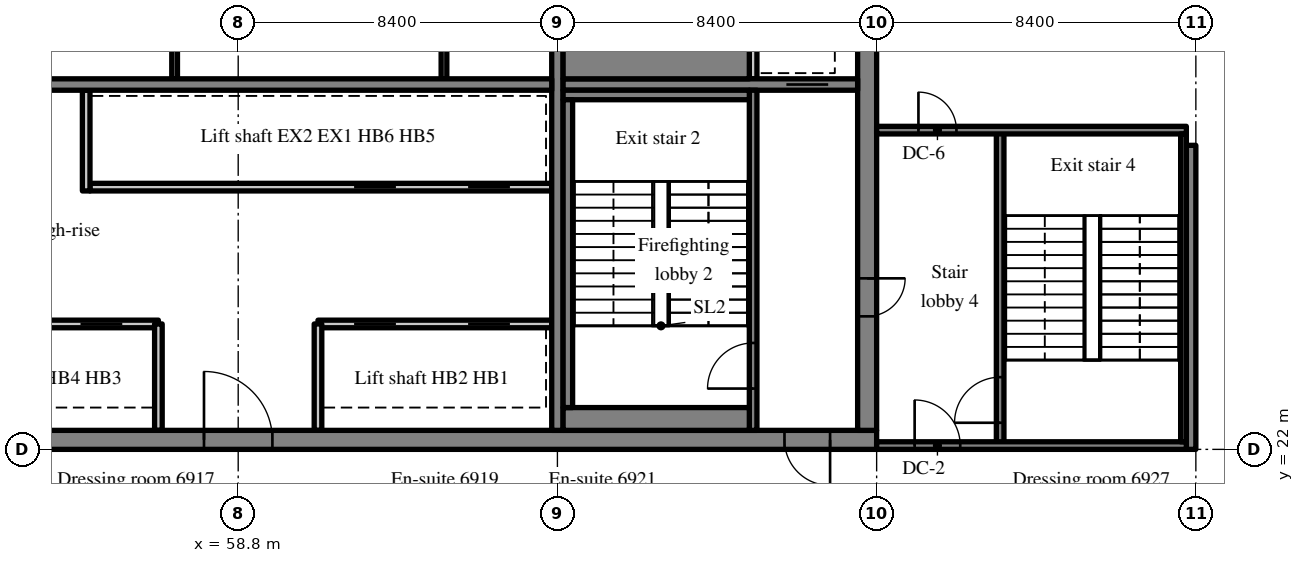
"""IFC4 building model, lengths in metres.
Left out: names, types, materials, properties, quantities, classifications, styles, units other than length and angle.
Written with IfcOpenShell. Run it as: python <this file> out.ifc"""

import sys

from ifc_helpers import new_model, si_unit, direction, frame, frame_2d, origin, place, context, subcontext, project, spatial, rectangle, extrude, source, transform, mapped, element, fill, save


model = new_model("IFC4")
c1 = context("Model", 3, precision=1e-05, world=origin(), true_north=direction((0.0, 1.0)))
c2 = subcontext(c1, "Body", "Model", "MODEL_VIEW")
j1 = project(units=[si_unit("LENGTHUNIT", "METRE"), si_unit("PLANEANGLEUNIT", "RADIAN")], contexts=[c1])
p1 = place(None, origin())
s1 = spatial("IfcSite", under=j1, at=p1, CompositionType="ELEMENT")
p2 = place(p1, origin())
s2 = spatial("IfcBuilding", under=s1, at=p2, CompositionType="ELEMENT")
p3 = place(p2, frame((0.0, 0.0, 289.7)))
s3 = spatial("IfcBuildingStorey", under=s2, at=p3, CompositionType="ELEMENT", Elevation=289.7)
m1 = source(origin(), c2, "Body", "SweptSolid", [
    extrude(rectangle(XDim=50.4, YDim=0.5, at=frame_2d((25.2, 0.0))), origin(), (0.0, 0.0, 1.0), 3.72),
])
p4 = place(p3, frame((25.2, 22.25, 0.0), z_axis=(0.0, 0.0, 1.0), x_axis=(1.0, 0.0, 0.0)))
e1 = element("IfcWall", 1, at=p4, inside=s3, PredefinedType="SHEAR", context=c2, shape_type="MappedRepresentation", body=[
    mapped(m1, transform((0.0, 0.0, 0.0), scale=1.0)),
])
m2 = source(origin(), c2, "Body", "SweptSolid", [
    extrude(rectangle(XDim=1.8, YDim=2.1, at=frame_2d((0.9, 1.05))), frame((0.0, 0.26, 0.0), z_axis=(0.0, -1.0, 0.0), x_axis=(1.0, 0.0, 0.0)), (0.0, 0.0, 1.0), 0.52),
])
p5 = place(p4, frame((15.9, 0.0, 0.0)))
e2 = element("IfcOpeningElement", 2, at=p5, cuts=e1, PredefinedType="OPENING", context=c2, shape_type="MappedRepresentation", body=[
    mapped(m2, transform((0.0, 0.0, 0.0), scale=1.0)),
])
m3 = source(origin(), c2, "Body", "SweptSolid", [
    extrude(rectangle(XDim=0.9, YDim=2.1, at=frame_2d((0.45, 1.05))), frame((0.0, 0.26, 0.0), z_axis=(0.0, -1.0, 0.0), x_axis=(1.0, 0.0, 0.0)), (0.0, 0.0, 1.0), 0.52),
])
p6 = place(p4, frame((9.675, 0.0, 0.0)))
e3 = element("IfcOpeningElement", 3, at=p6, cuts=e1, PredefinedType="OPENING", context=c2, shape_type="MappedRepresentation", body=[
    mapped(m3, transform((0.0, 0.0, 0.0), scale=1.0)),
])
p7 = place(p4, frame((21.525, 0.0, 0.0)))
e4 = element("IfcOpeningElement", 4, at=p7, cuts=e1, PredefinedType="OPENING", context=c2, shape_type="MappedRepresentation", body=[
    mapped(m3, transform((0.0, 0.0, 0.0), scale=1.0)),
])
p8 = place(p4, frame((32.7, 0.0, 0.0)))
e5 = element("IfcOpeningElement", 5, at=p8, cuts=e1, PredefinedType="OPENING", context=c2, shape_type="MappedRepresentation", body=[
    mapped(m2, transform((0.0, 0.0, 0.0), scale=1.0)),
])
m4 = source(origin(), c2, "Body", "SweptSolid", [
    extrude(rectangle(XDim=1.2, YDim=2.1, at=frame_2d((0.6, 1.05))), frame((0.0, 0.26, 0.0), z_axis=(0.0, -1.0, 0.0), x_axis=(1.0, 0.0, 0.0)), (0.0, 0.0, 1.0), 0.52),
])
p9 = place(p4, frame((6.5, 0.0, 0.0)))
e6 = element("IfcOpeningElement", 6, at=p9, cuts=e1, PredefinedType="OPENING", context=c2, shape_type="MappedRepresentation", body=[
    mapped(m4, transform((0.0, 0.0, 0.0), scale=1.0)),
])
p10 = place(p4, frame((47.975, 0.0, 0.0)))
e7 = element("IfcOpeningElement", 7, at=p10, cuts=e1, PredefinedType="OPENING", context=c2, shape_type="MappedRepresentation", body=[
    mapped(m4, transform((0.0, 0.0, 0.0), scale=1.0)),
])
m5 = source(origin(), c2, "Body", "SweptSolid", [
    extrude(rectangle(XDim=19.0, YDim=0.5, at=frame_2d((9.5, 0.0))), origin(), (0.0, 0.0, 1.0), 3.72),
])
p11 = place(p3, frame((75.35, 22.5, 0.0), z_axis=(0.0, 0.0, 1.0), x_axis=(0.0, 1.0, 0.0)))
e8 = element("IfcWall", 8, at=p11, inside=s3, PredefinedType="SHEAR", context=c2, shape_type="MappedRepresentation", body=[
    mapped(m5, transform((0.0, 0.0, 0.0), scale=1.0)),
])
m6 = source(origin(), c2, "Body", "SweptSolid", [
    extrude(rectangle(XDim=1.0, YDim=2.1, at=frame_2d((0.5, 1.05))), frame((0.0, 0.26, 0.0), z_axis=(0.0, -1.0, 0.0), x_axis=(1.0, 0.0, 0.0)), (0.0, 0.0, 1.0), 0.52),
])
p12 = place(p11, frame((3.0, 0.0, 0.0)))
e9 = element("IfcOpeningElement", 9, at=p12, cuts=e8, PredefinedType="OPENING", context=c2, shape_type="MappedRepresentation", body=[
    mapped(m6, transform((0.0, 0.0, 0.0), scale=1.0)),
])
p13 = place(p11, frame((12.9, 0.0, 0.0)))
e10 = element("IfcOpeningElement", 10, at=p13, cuts=e8, PredefinedType="OPENING", context=c2, shape_type="MappedRepresentation", body=[
    mapped(m4, transform((0.0, 0.0, 0.0), scale=1.0)),
])
m7 = source(origin(), c2, "Body", "SweptSolid", [
    extrude(rectangle(XDim=19.0, YDim=0.3, at=frame_2d((9.5, 0.0))), origin(), (0.0, 0.0, 1.0), 3.72),
])
p14 = place(p3, frame((67.2, 22.5, 0.0), z_axis=(0.0, 0.0, 1.0), x_axis=(0.0, 1.0, 0.0)))
e11 = element("IfcWall", 11, at=p14, inside=s3, PredefinedType="SHEAR", context=c2, shape_type="MappedRepresentation", body=[
    mapped(m7, transform((0.0, 0.0, 0.0), scale=1.0)),
])
m8 = source(origin(), c2, "Body", "SweptSolid", [
    extrude(rectangle(XDim=16.5, YDim=0.3, at=frame_2d((8.25, 0.0))), origin(), (0.0, 0.0, 1.0), 3.72),
])
p15 = place(p3, frame((50.55, 31.6, 0.0), z_axis=(0.0, 0.0, 1.0), x_axis=(1.0, 0.0, 0.0)))
e12 = element("IfcWall", 12, at=p15, inside=s3, PredefinedType="SHEAR", context=c2, shape_type="MappedRepresentation", body=[
    mapped(m8, transform((0.0, 0.0, 0.0), scale=1.0)),
])
m9 = source(origin(), c2, "Body", "SweptSolid", [
    extrude(rectangle(XDim=1.0, YDim=2.1, at=frame_2d((0.5, 1.05))), frame((0.0, 0.16, 0.0), z_axis=(0.0, -1.0, 0.0), x_axis=(1.0, 0.0, 0.0)), (0.0, 0.0, 1.0), 0.32),
])
p16 = place(p15, frame((0.625, 0.0, 0.0)))
e13 = element("IfcOpeningElement", 13, at=p16, cuts=e12, PredefinedType="OPENING", context=c2, shape_type="MappedRepresentation", body=[
    mapped(m9, transform((0.0, 0.0, 0.0), scale=1.0)),
])
m10 = source(origin(), c2, "Body", "SweptSolid", [
    extrude(rectangle(XDim=7.75, YDim=0.3, at=frame_2d((3.875, 0.0))), origin(), (0.0, 0.0, 1.0), 3.72),
])
p17 = place(p3, frame((67.35, 31.6, 0.0), z_axis=(0.0, 0.0, 1.0), x_axis=(1.0, 0.0, 0.0)))
e14 = element("IfcWall", 14, at=p17, inside=s3, PredefinedType="SHEAR", context=c2, shape_type="MappedRepresentation", body=[
    mapped(m10, transform((0.0, 0.0, 0.0), scale=1.0)),
])
m11 = source(origin(), c2, "Body", "SweptSolid", [
    extrude(rectangle(XDim=1.1, YDim=2.1, at=frame_2d((0.55, 1.05))), frame((0.0, 0.16, 0.0), z_axis=(0.0, -1.0, 0.0), x_axis=(1.0, 0.0, 0.0)), (0.0, 0.0, 1.0), 0.32),
])
p18 = place(p17, frame((5.875, 0.0, 0.0)))
e15 = element("IfcOpeningElement", 15, at=p18, cuts=e14, PredefinedType="OPENING", context=c2, shape_type="MappedRepresentation", body=[
    mapped(m11, transform((0.0, 0.0, 0.0), scale=1.0)),
])
m12 = source(origin(), c2, "Body", "SweptSolid", [
    extrude(rectangle(XDim=8.0, YDim=0.25, at=frame_2d((4.0, 0.0))), origin(), (0.0, 0.0, 1.0), 3.72),
])
p19 = place(p3, frame((83.875, 22.0, 0.0), z_axis=(0.0, 0.0, 1.0), x_axis=(0.0, 1.0, 0.0)))
e16 = element("IfcWall", 16, at=p19, inside=s3, PredefinedType="SHEAR", context=c2, shape_type="MappedRepresentation", body=[
    mapped(m12, transform((0.0, 0.0, 0.0), scale=1.0)),
])
m13 = source(origin(), c2, "Body", "SweptSolid", [
    extrude(rectangle(XDim=6.15, YDim=0.2, at=frame_2d((3.075, 0.0))), origin(), (0.0, 0.0, 1.0), 3.72),
])
p20 = place(p3, frame((67.05, 25.3, 0.0), z_axis=(0.0, 0.0, 1.0), x_axis=(-1.0, 0.0, 0.0)))
e17 = element("IfcWall", 17, at=p20, inside=s3, PredefinedType="SOLIDWALL", context=c2, shape_type="MappedRepresentation", body=[
    mapped(m13, transform((0.0, 0.0, 0.0), scale=1.0)),
])
m14 = source(origin(), c2, "Body", "SweptSolid", [
    extrude(rectangle(XDim=1.1, YDim=2.1, at=frame_2d((0.55, 1.05))), frame((0.0, 0.11, 0.0), z_axis=(0.0, -1.0, 0.0), x_axis=(1.0, 0.0, 0.0)), (0.0, 0.0, 1.0), 0.22),
])
p21 = place(p20, frame((1.1, 0.0, 0.0)))
e18 = element("IfcOpeningElement", 18, at=p21, cuts=e17, PredefinedType="OPENING", context=c2, shape_type="MappedRepresentation", body=[
    mapped(m14, transform((0.0, 0.0, 0.0), scale=1.0)),
])
p22 = place(p20, frame((4.1, 0.0, 0.0)))
e19 = element("IfcOpeningElement", 19, at=p22, cuts=e17, PredefinedType="OPENING", context=c2, shape_type="MappedRepresentation", body=[
    mapped(m14, transform((0.0, 0.0, 0.0), scale=1.0)),
])
m15 = source(origin(), c2, "Body", "SweptSolid", [
    extrude(rectangle(XDim=6.0, YDim=0.2, at=frame_2d((3.0, 0.0))), origin(), (0.0, 0.0, 1.0), 3.72),
])
p23 = place(p3, frame((56.7, 25.3, 0.0), z_axis=(0.0, 0.0, 1.0), x_axis=(-1.0, 0.0, 0.0)))
e20 = element("IfcWall", 20, at=p23, inside=s3, PredefinedType="SOLIDWALL", context=c2, shape_type="MappedRepresentation", body=[
    mapped(m15, transform((0.0, 0.0, 0.0), scale=1.0)),
])
p24 = place(p23, frame((0.95, 0.0, 0.0)))
e21 = element("IfcOpeningElement", 21, at=p24, cuts=e20, PredefinedType="OPENING", context=c2, shape_type="MappedRepresentation", body=[
    mapped(m14, transform((0.0, 0.0, 0.0), scale=1.0)),
])
p25 = place(p23, frame((3.95, 0.0, 0.0)))
e22 = element("IfcOpeningElement", 22, at=p25, cuts=e20, PredefinedType="OPENING", context=c2, shape_type="MappedRepresentation", body=[
    mapped(m14, transform((0.0, 0.0, 0.0), scale=1.0)),
])
m16 = source(origin(), c2, "Body", "SweptSolid", [
    extrude(rectangle(XDim=12.15, YDim=0.2, at=frame_2d((6.075, 0.0))), origin(), (0.0, 0.0, 1.0), 3.72),
])
p26 = place(p3, frame((67.05, 28.9, 0.0), z_axis=(0.0, 0.0, 1.0), x_axis=(-1.0, 0.0, 0.0)))
e23 = element("IfcWall", 23, at=p26, inside=s3, PredefinedType="SOLIDWALL", context=c2, shape_type="MappedRepresentation", body=[
    mapped(m16, transform((0.0, 0.0, 0.0), scale=1.0)),
])
p27 = place(p26, frame((1.1, 0.0, 0.0)))
e24 = element("IfcOpeningElement", 24, at=p27, cuts=e23, PredefinedType="OPENING", context=c2, shape_type="MappedRepresentation", body=[
    mapped(m14, transform((0.0, 0.0, 0.0), scale=1.0)),
])
p28 = place(p26, frame((4.1, 0.0, 0.0)))
e25 = element("IfcOpeningElement", 25, at=p28, cuts=e23, PredefinedType="OPENING", context=c2, shape_type="MappedRepresentation", body=[
    mapped(m14, transform((0.0, 0.0, 0.0), scale=1.0)),
])
m17 = source(origin(), c2, "Body", "SweptSolid", [
    extrude(rectangle(XDim=2.8, YDim=0.2, at=frame_2d((1.4, 0.0))), origin(), (0.0, 0.0, 1.0), 3.72),
])
for number, where, z_axis, x_axis in (
    (26, (60.9, 22.5, 0.0), (0.0, 0.0, 1.0), (0.0, 1.0, 0.0)),
    (27, (56.7, 22.5, 0.0), (0.0, 0.0, 1.0), (0.0, 1.0, 0.0)),
):
    element("IfcWall", number, at=place(p3, frame(where, z_axis=z_axis, x_axis=x_axis)), inside=s3, PredefinedType="SOLIDWALL", context=c2, shape_type="MappedRepresentation", body=[
        mapped(m17, transform((0.0, 0.0, 0.0), scale=1.0)),
    ])
m18 = source(origin(), c2, "Body", "SweptSolid", [
    extrude(rectangle(XDim=2.65, YDim=0.2, at=frame_2d((1.325, 0.0))), origin(), (0.0, 0.0, 1.0), 3.72),
])
p29 = place(p3, frame((54.8, 28.8, 0.0), z_axis=(0.0, 0.0, 1.0), x_axis=(0.0, 1.0, 0.0)))
e28 = element("IfcWall", 28, at=p29, inside=s3, PredefinedType="SOLIDWALL", context=c2, shape_type="MappedRepresentation", body=[
    mapped(m18, transform((0.0, 0.0, 0.0), scale=1.0)),
])
m19 = source(origin(), c2, "Body", "SweptSolid", [
    extrude(rectangle(XDim=3.25, YDim=0.15, at=frame_2d((1.625, 0.0))), origin(), (0.0, 0.0, 1.0), 3.72),
])
for number, where, z_axis, x_axis in (
    (29, (64.215, 31.75, 0.0), (0.0, 0.0, 1.0), (0.0, 1.0, 0.0)),
    (30, (57.127, 31.75, 0.0), (0.0, 0.0, 1.0), (0.0, 1.0, 0.0)),
):
    element("IfcWall", number, at=place(p3, frame(where, z_axis=z_axis, x_axis=x_axis)), inside=s3, PredefinedType="PARTITIONING", context=c2, shape_type="MappedRepresentation", body=[
        mapped(m19, transform((0.0, 0.0, 0.0), scale=1.0)),
    ])
m20 = source(origin(), c2, "Body", "SweptSolid", [
    extrude(rectangle(XDim=8.95, YDim=0.2, at=frame_2d((4.475, 0.0))), origin(), (0.0, 0.0, 1.0), 3.72),
])
p30 = place(p3, frame((72.35, 22.5, 0.0), z_axis=(0.0, 0.0, 1.0), x_axis=(0.0, 1.0, 0.0)))
e31 = element("IfcWall", 31, at=p30, inside=s3, PredefinedType="SOLIDWALL", context=c2, shape_type="MappedRepresentation", body=[
    mapped(m20, transform((0.0, 0.0, 0.0), scale=1.0)),
])
m21 = source(origin(), c2, "Body", "SweptSolid", [
    extrude(rectangle(XDim=1.2, YDim=2.1, at=frame_2d((0.6, 1.05))), frame((0.0, 0.11, 0.0), z_axis=(0.0, -1.0, 0.0), x_axis=(1.0, 0.0, 0.0)), (0.0, 0.0, 1.0), 0.22),
])
p31 = place(p30, frame((1.1, 0.0, 0.0)))
e32 = element("IfcOpeningElement", 32, at=p31, cuts=e31, PredefinedType="OPENING", context=c2, shape_type="MappedRepresentation", body=[
    mapped(m21, transform((0.0, 0.0, 0.0), scale=1.0)),
])
m22 = source(origin(), c2, "Body", "SweptSolid", [
    extrude(rectangle(XDim=1.85, YDim=0.2, at=frame_2d((0.925, 0.0))), origin(), (0.0, 0.0, 1.0), 3.72),
])
p32 = place(p3, frame((72.35, 31.75, 0.0), z_axis=(0.0, 0.0, 1.0), x_axis=(0.0, 1.0, 0.0)))
e33 = element("IfcWall", 33, at=p32, inside=s3, PredefinedType="SOLIDWALL", context=c2, shape_type="MappedRepresentation", body=[
    mapped(m22, transform((0.0, 0.0, 0.0), scale=1.0)),
])
m23 = source(origin(), c2, "Body", "SweptSolid", [
    extrude(rectangle(XDim=8.3, YDim=0.2, at=frame_2d((4.15, 0.0))), origin(), (0.0, 0.0, 1.0), 3.72),
])
p33 = place(p3, frame((78.85, 22.1, 0.0), z_axis=(0.0, 0.0, 1.0), x_axis=(0.0, 1.0, 0.0)))
e34 = element("IfcWall", 34, at=p33, inside=s3, PredefinedType="SOLIDWALL", context=c2, shape_type="MappedRepresentation", body=[
    mapped(m23, transform((0.0, 0.0, 0.0), scale=1.0)),
])
p34 = place(p33, frame((0.6, 0.0, 0.0)))
e35 = element("IfcOpeningElement", 35, at=p34, cuts=e34, PredefinedType="OPENING", context=c2, shape_type="MappedRepresentation", body=[
    mapped(m21, transform((0.0, 0.0, 0.0), scale=1.0)),
])
m24 = source(origin(), c2, "Body", "SweptSolid", [
    extrude(rectangle(XDim=8.15, YDim=0.2, at=frame_2d((4.075, 0.0))), origin(), (0.0, 0.0, 1.0), 3.72),
])
p35 = place(p3, frame((83.75, 22.1, 0.0), z_axis=(0.0, 0.0, 1.0), x_axis=(-1.0, 0.0, 0.0)))
e36 = element("IfcWall", 36, at=p35, inside=s3, PredefinedType="SOLIDWALL", context=c2, shape_type="MappedRepresentation", body=[
    mapped(m24, transform((0.0, 0.0, 0.0), scale=1.0)),
])
p36 = place(p35, frame((5.95, 0.0, 0.0)))
e37 = element("IfcOpeningElement", 37, at=p36, cuts=e36, PredefinedType="OPENING", context=c2, shape_type="MappedRepresentation", body=[
    mapped(m21, transform((0.0, 0.0, 0.0), scale=1.0)),
])
p37 = place(p3, frame((83.75, 30.4, 0.0), z_axis=(0.0, 0.0, 1.0), x_axis=(-1.0, 0.0, 0.0)))
e38 = element("IfcWall", 38, at=p37, inside=s3, PredefinedType="SOLIDWALL", context=c2, shape_type="MappedRepresentation", body=[
    mapped(m24, transform((0.0, 0.0, 0.0), scale=1.0)),
])
m25 = source(origin(), c2, "Body", "SweptSolid", [
    extrude(rectangle(XDim=1.0, YDim=2.1, at=frame_2d((0.5, 1.05))), frame((0.0, 0.11, 0.0), z_axis=(0.0, -1.0, 0.0), x_axis=(1.0, 0.0, 0.0)), (0.0, 0.0, 1.0), 0.22),
])
p38 = place(p37, frame((6.05, 0.0, 0.0)))
e39 = element("IfcOpeningElement", 39, at=p38, cuts=e38, PredefinedType="OPENING", context=c2, shape_type="MappedRepresentation", body=[
    mapped(m25, transform((0.0, 0.0, 0.0), scale=1.0)),
])
m26 = source(origin(), c2, "Body", "SweptSolid", [
    extrude(rectangle(XDim=4.9, YDim=0.6, at=frame_2d((2.45, 0.0))), origin(), (0.0, 0.0, 1.0), 3.72),
])
p39 = place(p3, frame((67.35, 22.8, 0.0), z_axis=(0.0, 0.0, 1.0), x_axis=(1.0, 0.0, 0.0)))
e40 = element("IfcWall", 40, at=p39, inside=s3, PredefinedType="SOLIDWALL", context=c2, shape_type="MappedRepresentation", body=[
    mapped(m26, transform((0.0, 0.0, 0.0), scale=1.0)),
])
m27 = source(origin(), c2, "Body", "SweptSolid", [
    extrude(rectangle(XDim=4.9, YDim=0.25, at=frame_2d((2.45, 0.0))), origin(), (0.0, 0.0, 1.0), 3.72),
])
p40 = place(p3, frame((67.35, 31.325, 0.0), z_axis=(0.0, 0.0, 1.0), x_axis=(1.0, 0.0, 0.0)))
e41 = element("IfcWall", 41, at=p40, inside=s3, PredefinedType="SOLIDWALL", context=c2, shape_type="MappedRepresentation", body=[
    mapped(m27, transform((0.0, 0.0, 0.0), scale=1.0)),
])
m28 = source(origin(), c2, "Body", "SweptSolid", [
    extrude(rectangle(XDim=8.1, YDim=0.25, at=frame_2d((4.05, 0.0))), origin(), (0.0, 0.0, 1.0), 3.72),
])
p41 = place(p3, frame((67.475, 23.1, 0.0), z_axis=(0.0, 0.0, 1.0), x_axis=(0.0, 1.0, 0.0)))
e42 = element("IfcWall", 42, at=p41, inside=s3, PredefinedType="SOLIDWALL", context=c2, shape_type="MappedRepresentation", body=[
    mapped(m28, transform((0.0, 0.0, 0.0), scale=1.0)),
])
m29 = source(origin(), c2, "Body", "SweptSolid", [
    extrude(rectangle(XDim=4.9, YDim=1.05, at=frame_2d((2.45, 0.0))), origin(), (0.0, 0.0, 1.0), 3.72),
])
p42 = place(p3, frame((67.35, 32.275, 0.0), z_axis=(0.0, 0.0, 1.0), x_axis=(1.0, 0.0, 0.0)))
e43 = element("IfcWall", 43, at=p42, inside=s3, PredefinedType="SOLIDWALL", context=c2, shape_type="MappedRepresentation", body=[
    mapped(m29, transform((0.0, 0.0, 0.0), scale=1.0)),
])
m30 = source(origin(), c2, "Body", "SweptSolid", [
    extrude(rectangle(XDim=8.1, YDim=0.15, at=frame_2d((4.05, 0.0))), origin(), (0.0, 0.0, 1.0), 3.72),
])
p43 = place(p3, frame((83.675, 22.2, 0.0), z_axis=(0.0, 0.0, 1.0), x_axis=(0.0, 1.0, 0.0)))
e44 = element("IfcWall", 44, at=p43, inside=s3, PredefinedType="SOLIDWALL", context=c2, shape_type="MappedRepresentation", body=[
    mapped(m30, transform((0.0, 0.0, 0.0), scale=1.0)),
])
m31 = source(origin(), c2, "Body", "SweptSolid", [
    extrude(rectangle(XDim=1.8, YDim=2.1, at=frame_2d((0.9, 1.05))), frame((0.0, 0.175, 0.0), z_axis=(0.0, -1.0, 0.0), x_axis=(1.0, 0.0, 0.0)), (0.0, 0.0, 1.0), 0.05),
])
p44 = place(p8, origin())
e45 = element("IfcDoor", 45, at=p44, inside=s3, OperationType="DOUBLE_DOOR_SINGLE_SWING", PredefinedType="DOOR", context=c2, shape_type="MappedRepresentation", body=[
    mapped(m31, transform((0.0, 0.0, 0.0), scale=1.0)),
])
fill(e5, e45)
m32 = source(origin(), c2, "Body", "SweptSolid", [
    extrude(rectangle(XDim=1.1, YDim=2.1, at=frame_2d((0.55, 1.05))), frame((0.0, 0.025, 0.0), z_axis=(0.0, -1.0, 0.0), x_axis=(1.0, 0.0, 0.0)), (0.0, 0.0, 1.0), 0.05),
])
p45 = place(p21, origin())
e46 = element("IfcDoor", 46, at=p45, inside=s3, OperationType="SLIDING_TO_RIGHT", PredefinedType="DOOR", context=c2, shape_type="MappedRepresentation", body=[
    mapped(m32, transform((0.0, 0.0, 0.0), scale=1.0)),
])
fill(e18, e46)
p46 = place(p22, origin())
e47 = element("IfcDoor", 47, at=p46, inside=s3, OperationType="SLIDING_TO_LEFT", PredefinedType="DOOR", context=c2, shape_type="MappedRepresentation", body=[
    mapped(m32, transform((0.0, 0.0, 0.0), scale=1.0)),
])
fill(e19, e47)
p47 = place(p24, origin())
e48 = element("IfcDoor", 48, at=p47, inside=s3, OperationType="SLIDING_TO_RIGHT", PredefinedType="DOOR", context=c2, shape_type="MappedRepresentation", body=[
    mapped(m32, transform((0.0, 0.0, 0.0), scale=1.0)),
])
fill(e21, e48)
p48 = place(p27, origin())
e49 = element("IfcDoor", 49, at=p48, inside=s3, OperationType="SLIDING_TO_RIGHT", PredefinedType="DOOR", context=c2, shape_type="MappedRepresentation", body=[
    mapped(m32, transform((0.0, 0.0, 0.0), scale=1.0)),
])
fill(e24, e49)
p49 = place(p28, origin())
e50 = element("IfcDoor", 50, at=p49, inside=s3, OperationType="SLIDING_TO_LEFT", PredefinedType="DOOR", context=c2, shape_type="MappedRepresentation", body=[
    mapped(m32, transform((0.0, 0.0, 0.0), scale=1.0)),
])
fill(e25, e50)
m33 = source(origin(), c2, "Body", "SweptSolid", [
    extrude(rectangle(XDim=1.2, YDim=2.1, at=frame_2d((0.6, 1.05))), frame((0.0, 0.025, 0.0), z_axis=(0.0, -1.0, 0.0), x_axis=(1.0, 0.0, 0.0)), (0.0, 0.0, 1.0), 0.05),
])
p50 = place(p31, origin())
e51 = element("IfcDoor", 51, at=p50, inside=s3, OperationType="SINGLE_SWING_LEFT", PredefinedType="DOOR", context=c2, shape_type="MappedRepresentation", body=[
    mapped(m33, transform((0.0, 0.0, 0.0), scale=1.0)),
])
fill(e32, e51)
m34 = source(origin(), c2, "Body", "SweptSolid", [
    extrude(rectangle(XDim=1.2, YDim=2.1, at=frame_2d((0.6, 1.05))), frame((0.0, 0.175, 0.0), z_axis=(0.0, -1.0, 0.0), x_axis=(1.0, 0.0, 0.0)), (0.0, 0.0, 1.0), 0.05),
])
p51 = place(p10, origin())
e52 = element("IfcDoor", 52, at=p51, inside=s3, OperationType="SINGLE_SWING_RIGHT", PredefinedType="DOOR", context=c2, shape_type="MappedRepresentation", body=[
    mapped(m34, transform((0.0, 0.0, 0.0), scale=1.0)),
])
fill(e7, e52)
p52 = place(p18, origin())
e53 = element("IfcDoor", 53, at=p52, inside=s3, OperationType="SLIDING_TO_LEFT", PredefinedType="DOOR", context=c2, shape_type="MappedRepresentation", body=[
    mapped(m32, transform((0.0, 0.0, 0.0), scale=1.0)),
])
fill(e15, e53)
m35 = source(origin(), c2, "Body", "SweptSolid", [
    extrude(rectangle(XDim=1.0, YDim=2.1, at=frame_2d((0.5, 1.05))), frame((0.0, 0.025, 0.0), z_axis=(0.0, -1.0, 0.0), x_axis=(1.0, 0.0, 0.0)), (0.0, 0.0, 1.0), 0.05),
])
p53 = place(p12, origin())
e54 = element("IfcDoor", 54, at=p53, inside=s3, OperationType="SINGLE_SWING_RIGHT", PredefinedType="DOOR", context=c2, shape_type="MappedRepresentation", body=[
    mapped(m35, transform((0.0, 0.0, 0.0), scale=1.0)),
])
fill(e9, e54)
p54 = place(p34, origin())
e55 = element("IfcDoor", 55, at=p54, inside=s3, OperationType="SINGLE_SWING_LEFT", PredefinedType="DOOR", context=c2, shape_type="MappedRepresentation", body=[
    mapped(m33, transform((0.0, 0.0, 0.0), scale=1.0)),
])
fill(e35, e55)
p55 = place(p36, origin())
e56 = element("IfcDoor", 56, at=p55, inside=s3, OperationType="SINGLE_SWING_RIGHT", PredefinedType="DOOR", context=c2, shape_type="MappedRepresentation", body=[
    mapped(m33, transform((0.0, 0.0, 0.0), scale=1.0)),
])
fill(e37, e56)
p56 = place(p38, origin())
e57 = element("IfcDoor", 57, at=p56, inside=s3, OperationType="SINGLE_SWING_RIGHT", PredefinedType="DOOR", context=c2, shape_type="MappedRepresentation", body=[
    mapped(m35, transform((0.0, 0.0, 0.0), scale=1.0)),
])
fill(e39, e57)
save(model, sys.argv[1])
